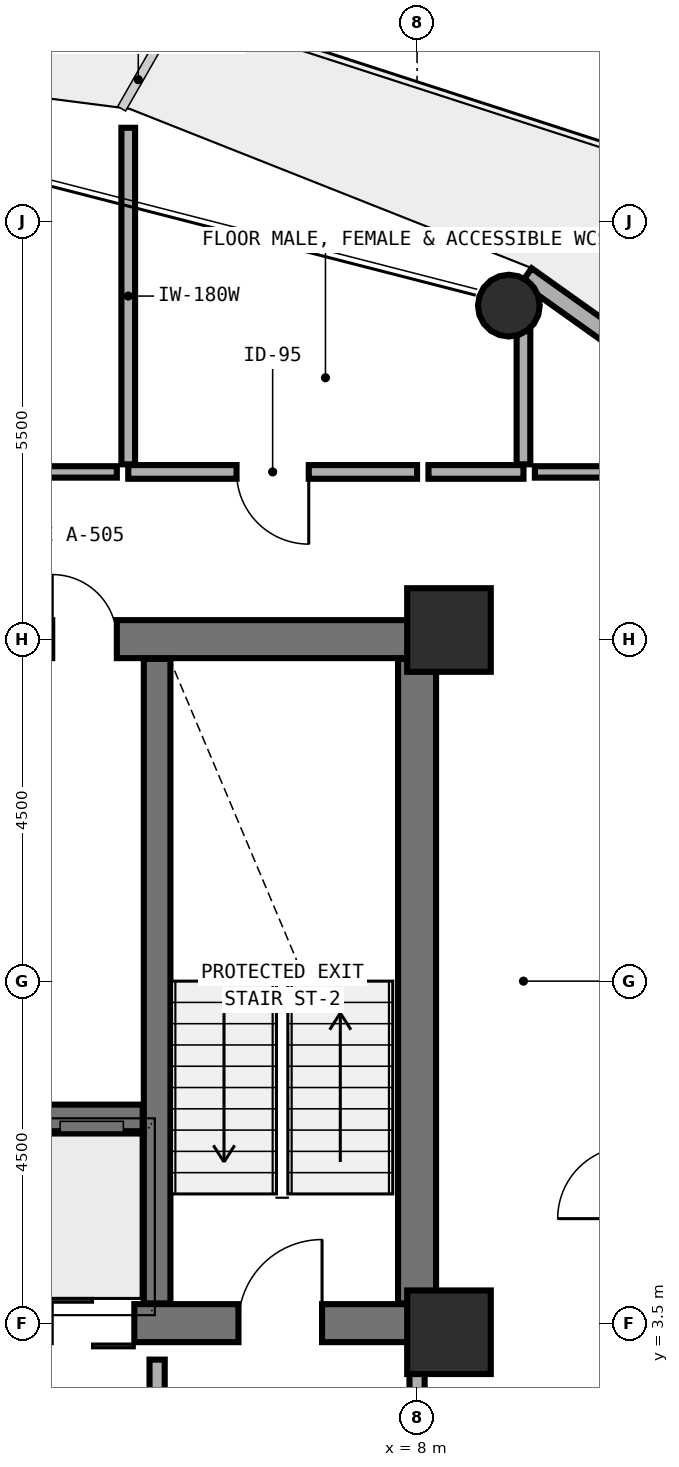
"""IFC4 building model, lengths in metres.
Left out: names, types, materials, properties, quantities, classifications, styles, units other than length and angle.
Written with IfcOpenShell. Run it as: python <this file> out.ifc"""

import sys

from ifc_helpers import new_model, si_unit, direction, frame, frame_2d, origin, origin_2d, place, context, subcontext, project, spatial, rectangle, hollow_circle, extrude, element, fill, save


model = new_model("IFC4")
c1 = context("Model", 3, precision=1e-05, world=origin(), true_north=direction((0.0, 1.0)))
c2 = subcontext(c1, "Body", "Model", "MODEL_VIEW")
j1 = project(units=[si_unit("LENGTHUNIT", "METRE"), si_unit("PLANEANGLEUNIT", "RADIAN")], contexts=[c1])
p1 = place(None, origin())
s1 = spatial("IfcSite", under=j1, at=p1, CompositionType="ELEMENT")
p2 = place(p1, origin())
s2 = spatial("IfcBuilding", under=s1, at=p2, CompositionType="ELEMENT")
p3 = place(p2, frame((0.0, 0.0, 103.2)))
s3 = spatial("IfcBuildingStorey", under=s2, at=p3, CompositionType="ELEMENT", Elevation=103.2)
p4 = place(p3, frame((-2.0, 3.5, 0.0), z_axis=(0.0, 0.0, 1.0), x_axis=(1.0, 0.0, 0.0)))
e1 = element("IfcWall", 1, at=p4, inside=s3, PredefinedType="SHEAR", context=c2, shape_type="SweptSolid", body=[
    extrude(rectangle(XDim=10.0, YDim=0.5, at=frame_2d((5.0, 0.0))), origin(), (0.0, 0.0, 1.0), 3.892),
])
p5 = place(p4, frame((1.65, 0.0, 0.0)))
e2 = element("IfcOpeningElement", 2, at=p5, cuts=e1, PredefinedType="OPENING", context=c2, shape_type="SweptSolid", body=[
    extrude(rectangle(XDim=1.1, YDim=2.15, at=frame_2d((0.55, 1.075))), frame((0.0, 0.26, 0.0), z_axis=(0.0, -1.0, 0.0), x_axis=(1.0, 0.0, 0.0)), (0.0, 0.0, 1.0), 0.52),
])
p6 = place(p4, frame((7.65, 0.0, 0.0)))
e3 = element("IfcOpeningElement", 3, at=p6, cuts=e1, PredefinedType="OPENING", context=c2, shape_type="SweptSolid", body=[
    extrude(rectangle(XDim=1.1, YDim=2.15, at=frame_2d((0.55, 1.075))), frame((0.0, 0.26, 0.0), z_axis=(0.0, -1.0, 0.0), x_axis=(1.0, 0.0, 0.0)), (0.0, 0.0, 1.0), 0.52),
])
p7 = place(p4, frame((3.72, 0.0, 0.0)))
e4 = element("IfcOpeningElement", 4, at=p7, cuts=e1, PredefinedType="OPENING", context=c2, shape_type="SweptSolid", body=[
    extrude(rectangle(XDim=1.1, YDim=2.2, at=frame_2d((0.55, 1.1))), frame((0.0, 0.26, 0.0), z_axis=(0.0, -1.0, 0.0), x_axis=(1.0, 0.0, 0.0)), (0.0, 0.0, 1.0), 0.52),
])
p8 = place(p4, frame((5.18, 0.0, 0.0)))
e5 = element("IfcOpeningElement", 5, at=p8, cuts=e1, PredefinedType="OPENING", context=c2, shape_type="SweptSolid", body=[
    extrude(rectangle(XDim=1.1, YDim=2.2, at=frame_2d((0.55, 1.1))), frame((0.0, 0.26, 0.0), z_axis=(0.0, -1.0, 0.0), x_axis=(1.0, 0.0, 0.0)), (0.0, 0.0, 1.0), 0.52),
])
p9 = place(p3, frame((-2.0, 12.5, 0.0), z_axis=(0.0, 0.0, 1.0), x_axis=(1.0, 0.0, 0.0)))
e6 = element("IfcWall", 6, at=p9, inside=s3, PredefinedType="SHEAR", context=c2, shape_type="SweptSolid", body=[
    extrude(rectangle(XDim=10.0, YDim=0.5, at=frame_2d((5.0, 0.0))), origin(), (0.0, 0.0, 1.0), 3.892),
])
p10 = place(p9, frame((5.2, 0.0, 0.0)))
e7 = element("IfcOpeningElement", 7, at=p10, cuts=e6, PredefinedType="OPENING", context=c2, shape_type="SweptSolid", body=[
    extrude(rectangle(XDim=0.85, YDim=2.1, at=frame_2d((0.425, 1.05))), frame((0.0, 0.26, 0.0), z_axis=(0.0, -1.0, 0.0), x_axis=(1.0, 0.0, 0.0)), (0.0, 0.0, 1.0), 0.52),
])
p11 = place(p3, frame((8.0, 3.76, 0.0), z_axis=(0.0, 0.0, 1.0), x_axis=(0.0, 1.0, 0.0)))
e8 = element("IfcWall", 8, at=p11, inside=s3, PredefinedType="SHEAR", context=c2, shape_type="SweptSolid", body=[
    extrude(rectangle(XDim=8.48, YDim=0.5, at=frame_2d((4.24, 0.0))), origin(), (0.0, 0.0, 1.0), 3.892),
])
p12 = place(p3, frame((4.58, 3.76, 0.0), z_axis=(0.0, 0.0, 1.0), x_axis=(0.0, 1.0, 0.0)))
e9 = element("IfcWall", 9, at=p12, inside=s3, PredefinedType="SHEAR", context=c2, shape_type="SweptSolid", body=[
    extrude(rectangle(XDim=8.48, YDim=0.35, at=frame_2d((4.24, 0.0))), origin(), (0.0, 0.0, 1.0), 3.892),
])
p13 = place(p3, frame((1.61, 6.2, 0.0), z_axis=(0.0, 0.0, 1.0), x_axis=(1.0, 0.0, 0.0)))
e10 = element("IfcWall", 10, at=p13, inside=s3, PredefinedType="SHEAR", context=c2, shape_type="SweptSolid", body=[
    extrude(rectangle(XDim=2.78, YDim=0.35, at=frame_2d((1.39, 0.0))), origin(), (0.0, 0.0, 1.0), 3.892),
])
for number, where, z_axis, x_axis in (
    (11, (8.42, 12.62, 0.0), (0.0, 0.0, 1.0), (1.0, 0.0, 0.0)),
    (12, (8.42, 3.38, 0.0), (0.0, 0.0, 1.0), (1.0, 0.0, 0.0)),
):
    element("IfcColumn", number, at=place(p3, frame(where, z_axis=z_axis, x_axis=x_axis)), inside=s3, PredefinedType="COLUMN", context=c2, shape_type="SweptSolid", body=[
        extrude(rectangle(XDim=1.1, YDim=1.1, at=origin_2d()), origin(), (0.0, 0.0, 1.0), 3.875),
    ])
p14 = place(p3, frame((9.224, 16.909, 0.0), z_axis=(-0.008567742463, -0.010709678078, 0.999905943869), x_axis=(0.780868809443, -0.624695047554, 0.0)))
e13 = element("IfcColumn", 13, at=p14, inside=s3, PredefinedType="COLUMN", context=c2, shape_type="SweptSolid", body=[
    extrude(hollow_circle(Radius=0.406, WallThickness=0.03, at=origin_2d()), origin(), (0.0, 0.0, 1.0), 3.875),
])
p15 = place(p3, frame((9.439, 17.281, 0.0), z_axis=(0.0, 0.0, 1.0), x_axis=(0.814664326387, -0.579932785168, 0.0)))
e14 = element("IfcWall", 14, at=p15, inside=s3, PredefinedType="SOLIDWALL", context=c2, shape_type="SweptSolid", body=[
    extrude(rectangle(XDim=5.523, YDim=0.24, at=frame_2d((2.761, 0.0))), origin(), (0.0, 0.0, 1.0), 3.11),
])
p16 = place(p3, frame((4.58, 0.83, 0.0), z_axis=(0.0, 0.0, 1.0), x_axis=(0.0, 1.0, 0.0)))
e15 = element("IfcWall", 15, at=p16, inside=s3, PredefinedType="MOVABLE", context=c2, shape_type="SweptSolid", body=[
    extrude(rectangle(XDim=2.19, YDim=0.2, at=frame_2d((1.095, 0.0))), origin(), (0.0, 0.0, 1.0), 3.64),
])
p17 = place(p16, frame((0.66, 0.0, 0.0)))
e16 = element("IfcOpeningElement", 16, at=p17, cuts=e15, PredefinedType="OPENING", context=c2, shape_type="SweptSolid", body=[
    extrude(rectangle(XDim=1.0, YDim=2.1, at=frame_2d((0.5, 1.05))), frame((0.0, 0.11, 0.0), z_axis=(0.0, -1.0, 0.0), x_axis=(1.0, 0.0, 0.0)), (0.0, 0.0, 1.0), 0.22),
])
p18 = place(p3, frame((8.0, 0.72, 0.0), z_axis=(0.0, 0.0, 1.0), x_axis=(0.0, 1.0, 0.0)))
e17 = element("IfcWall", 17, at=p18, inside=s3, PredefinedType="MOVABLE", context=c2, shape_type="SweptSolid", body=[
    extrude(rectangle(XDim=2.3, YDim=0.2, at=frame_2d((1.15, 0.0))), origin(), (0.0, 0.0, 1.0), 2.872),
])
p19 = place(p18, frame((0.845, 0.0, 0.0)))
e18 = element("IfcOpeningElement", 18, at=p19, cuts=e17, PredefinedType="OPENING", context=c2, shape_type="SweptSolid", body=[
    extrude(rectangle(XDim=0.85, YDim=2.1, at=frame_2d((0.425, 1.05))), frame((0.0, 0.11, 0.0), z_axis=(0.0, -1.0, 0.0), x_axis=(1.0, 0.0, 0.0)), (0.0, 0.0, 1.0), 0.22),
])
p20 = place(p3, frame((8.0, 14.7, 0.0), z_axis=(0.0, 0.0, 1.0), x_axis=(-1.0, 0.0, 0.0)))
e19 = element("IfcWall", 19, at=p20, inside=s3, PredefinedType="PLUMBINGWALL", context=c2, shape_type="SweptSolid", body=[
    extrude(rectangle(XDim=3.8, YDim=0.18, at=frame_2d((1.9, 0.0))), origin(), (0.0, 0.0, 1.0), 3.172),
])
p21 = place(p20, frame((1.425, 0.0, 0.0)))
e20 = element("IfcOpeningElement", 20, at=p21, cuts=e19, PredefinedType="OPENING", context=c2, shape_type="SweptSolid", body=[
    extrude(rectangle(XDim=0.95, YDim=2.1, at=frame_2d((0.475, 1.05))), frame((0.0, 0.1, 0.0), z_axis=(0.0, -1.0, 0.0), x_axis=(1.0, 0.0, 0.0)), (0.0, 0.0, 1.0), 0.2),
])
p22 = place(p3, frame((9.4, 14.7, 0.0), z_axis=(0.0, 0.0, 1.0), x_axis=(-1.0, 0.0, 0.0)))
e21 = element("IfcWall", 21, at=p22, inside=s3, PredefinedType="PLUMBINGWALL", context=c2, shape_type="SweptSolid", body=[
    extrude(rectangle(XDim=1.25, YDim=0.18, at=frame_2d((0.625, 0.0))), origin(), (0.0, 0.0, 1.0), 3.172),
])
p23 = place(p3, frame((4.05, 14.7, 0.0), z_axis=(0.0, 0.0, 1.0), x_axis=(-1.0, 0.0, 0.0)))
e22 = element("IfcWall", 22, at=p23, inside=s3, PredefinedType="PARTITIONING", context=c2, shape_type="SweptSolid", body=[
    extrude(rectangle(XDim=2.74, YDim=0.15, at=frame_2d((1.37, 0.0))), origin(), (0.0, 0.0, 1.0), 3.172),
])
p24 = place(p3, frame((4.2, 19.228, 0.0), z_axis=(0.0, 0.0, 1.0), x_axis=(0.0, -1.0, 0.0)))
e23 = element("IfcWall", 23, at=p24, inside=s3, PredefinedType="PLUMBINGWALL", context=c2, shape_type="SweptSolid", body=[
    extrude(rectangle(XDim=4.428, YDim=0.18, at=frame_2d((2.214, 0.0))), origin(), (0.0, 0.0, 1.0), 3.64),
])
p25 = place(p3, frame((10.715, 14.7, 0.0), z_axis=(0.0, 0.0, 1.0), x_axis=(-1.0, 0.0, 0.0)))
e24 = element("IfcWall", 24, at=p25, inside=s3, PredefinedType="PARTITIONING", context=c2, shape_type="SweptSolid", body=[
    extrude(rectangle(XDim=1.165, YDim=0.15, at=frame_2d((0.583, 0.0))), origin(), (0.0, 0.0, 1.0), 3.64),
])
p26 = place(p3, frame((9.4, 14.8, 0.0), z_axis=(0.0, 0.0, 1.0), x_axis=(0.0, 1.0, 0.0)))
e25 = element("IfcWall", 25, at=p26, inside=s3, PredefinedType="PLUMBINGWALL", context=c2, shape_type="SweptSolid", body=[
    extrude(rectangle(XDim=2.363, YDim=0.18, at=frame_2d((1.182, 0.0))), origin(), (0.0, 0.0, 1.0), 3.022),
])
p27 = place(p6, origin())
e26 = element("IfcDoor", 26, at=p27, inside=s3, OperationType="SINGLE_SWING_RIGHT", PredefinedType="DOOR", context=c2, shape_type="SweptSolid", body=[
    extrude(rectangle(XDim=1.1, YDim=2.15, at=frame_2d((0.55, 1.075))), frame((0.0, 0.025, 0.0), z_axis=(0.0, -1.0, 0.0), x_axis=(1.0, 0.0, 0.0)), (0.0, 0.0, 1.0), 0.05),
])
fill(e3, e26)
p28 = place(p8, origin())
e27 = element("IfcDoor", 27, at=p28, inside=s3, OperationType="DOUBLE_DOOR_SLIDING", PredefinedType="DOOR", context=c2, shape_type="SweptSolid", body=[
    extrude(rectangle(XDim=1.1, YDim=2.2, at=frame_2d((0.55, 1.1))), frame((0.0, 0.025, 0.0), z_axis=(0.0, -1.0, 0.0), x_axis=(1.0, 0.0, 0.0)), (0.0, 0.0, 1.0), 0.05),
])
fill(e5, e27)
p29 = place(p10, origin())
e28 = element("IfcDoor", 28, at=p29, inside=s3, OperationType="SINGLE_SWING_LEFT", PredefinedType="DOOR", context=c2, shape_type="SweptSolid", body=[
    extrude(rectangle(XDim=0.85, YDim=2.1, at=frame_2d((0.425, 1.05))), frame((0.0, 0.025, 0.0), z_axis=(0.0, -1.0, 0.0), x_axis=(1.0, 0.0, 0.0)), (0.0, 0.0, 1.0), 0.05),
])
fill(e7, e28)
p30 = place(p21, origin())
e29 = element("IfcDoor", 29, at=p30, inside=s3, OperationType="SINGLE_SWING_LEFT", PredefinedType="DOOR", context=c2, shape_type="SweptSolid", body=[
    extrude(rectangle(XDim=0.95, YDim=2.1, at=frame_2d((0.475, 1.05))), frame((0.0, 0.025, 0.0), z_axis=(0.0, -1.0, 0.0), x_axis=(1.0, 0.0, 0.0)), (0.0, 0.0, 1.0), 0.05),
])
fill(e20, e29)
save(model, sys.argv[1])
